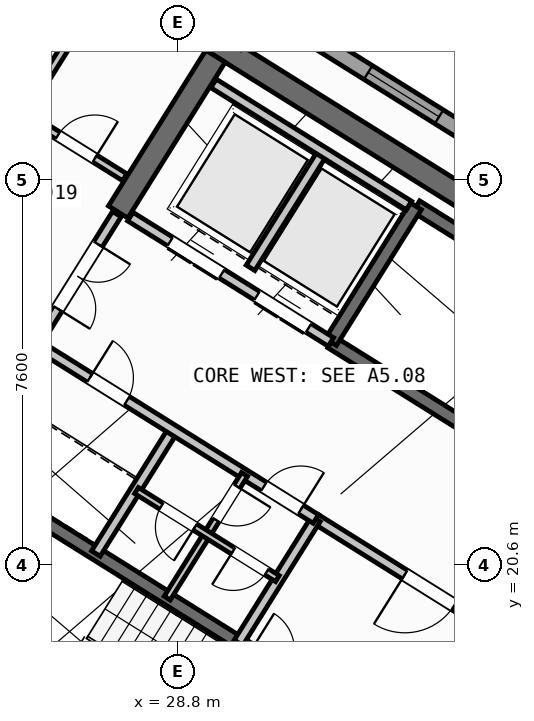
"""IFC4 building model, lengths in metres.
Left out: names, types, materials, properties, quantities, classifications, styles, units other than length and angle.
Written with IfcOpenShell. Run it as: python <this file> out.ifc"""

import sys

from ifc_helpers import new_model, si_unit, direction, frame, frame_2d, origin, place, context, subcontext, project, spatial, rectangle, extrude, source, transform, mapped, element, fill, save


model = new_model("IFC4")
c1 = context("Model", 3, precision=1e-05, world=origin(), true_north=direction((0.0, 1.0)))
c2 = subcontext(c1, "Body", "Model", "MODEL_VIEW")
j1 = project(units=[si_unit("LENGTHUNIT", "METRE"), si_unit("PLANEANGLEUNIT", "RADIAN")], contexts=[c1])
p1 = place(None, origin())
s1 = spatial("IfcSite", under=j1, at=p1, CompositionType="ELEMENT")
p2 = place(p1, origin())
s2 = spatial("IfcBuilding", under=s1, at=p2, CompositionType="ELEMENT")
p3 = place(p2, frame((0.0, 0.0, 277.2)))
s3 = spatial("IfcBuildingStorey", under=s2, at=p3, CompositionType="ELEMENT", Elevation=277.2)
p4 = place(p3, frame((40.531, 24.036, 0.0), z_axis=(0.0, 0.0, 1.0), x_axis=(-0.848048787466, 0.529918157905, 0.0)))
e1 = element("IfcWall", 1, at=p4, inside=s3, PredefinedType="SHEAR", context=c2, shape_type="SweptSolid", body=[
    extrude(rectangle(XDim=13.04, YDim=0.45, at=frame_2d((6.52, 0.0))), origin(), (0.0, 0.0, 1.0), 3.35),
])
p5 = place(p3, frame((33.324, 12.503, 0.0), z_axis=(0.0, 0.0, 1.0), x_axis=(-0.848043529849, 0.529926571782, 0.0)))
e2 = element("IfcWall", 2, at=p5, inside=s3, PredefinedType="SHEAR", context=c2, shape_type="SweptSolid", body=[
    extrude(rectangle(XDim=13.04, YDim=0.45, at=frame_2d((6.52, 0.0))), origin(), (0.0, 0.0, 1.0), 3.35),
])
p6 = place(p3, frame((29.544, 30.636, 0.0), z_axis=(0.0, 0.0, 1.0), x_axis=(-0.529902075036, -0.848058836916, 0.0)))
e3 = element("IfcWall", 3, at=p6, inside=s3, PredefinedType="SHEAR", context=c2, shape_type="SweptSolid", body=[
    extrude(rectangle(XDim=3.625, YDim=0.45, at=frame_2d((1.812, 0.0))), origin(), (0.0, 0.0, 1.0), 3.35),
])
p7 = place(p3, frame((29.268, 6.429, 0.0), z_axis=(0.0, 0.0, 1.0), x_axis=(-0.848049971435, 0.529916263149, 0.0)))
e4 = element("IfcWall", 4, at=p7, inside=s3, PredefinedType="STANDARD", context=c2, shape_type="SweptSolid", body=[
    extrude(rectangle(XDim=31.588, YDim=0.32, at=frame_2d((15.794, 0.0))), origin(), (0.0, 0.0, 1.0), 3.35),
])
p8 = place(p7, frame((16.362, 0.0, 0.0)))
e5 = element("IfcOpeningElement", 5, at=p8, cuts=e4, PredefinedType="OPENING", context=c2, shape_type="SweptSolid", body=[
    extrude(rectangle(XDim=1.2, YDim=2.15, at=frame_2d((0.6, 1.075))), frame((0.0, 0.17, 0.0), z_axis=(0.0, -1.0, 0.0), x_axis=(1.0, 0.0, 0.0)), (0.0, 0.0, 1.0), 0.34),
])
p9 = place(p7, frame((3.859, 0.0, 0.9)))
e6 = element("IfcOpeningElement", 6, at=p9, cuts=e4, PredefinedType="OPENING", context=c2, shape_type="SweptSolid", body=[
    extrude(rectangle(XDim=1.65, YDim=1.45, at=frame_2d((0.825, 0.725))), frame((0.0, 0.17, 0.0), z_axis=(0.0, -1.0, 0.0), x_axis=(1.0, 0.0, 0.0)), (0.0, 0.0, 1.0), 0.34),
])
p10 = place(p7, frame((10.519, 0.0, 0.9)))
e7 = element("IfcOpeningElement", 7, at=p10, cuts=e4, PredefinedType="OPENING", context=c2, shape_type="SweptSolid", body=[
    extrude(rectangle(XDim=1.65, YDim=1.45, at=frame_2d((0.825, 0.725))), frame((0.0, 0.17, 0.0), z_axis=(0.0, -1.0, 0.0), x_axis=(1.0, 0.0, 0.0)), (0.0, 0.0, 1.0), 0.34),
])
p11 = place(p7, frame((20.015, 0.0, 0.95)))
e8 = element("IfcOpeningElement", 8, at=p11, cuts=e4, PredefinedType="OPENING", context=c2, shape_type="SweptSolid", body=[
    extrude(rectangle(XDim=1.95, YDim=1.35, at=frame_2d((0.975, 0.675))), frame((0.0, 0.17, 0.0), z_axis=(0.0, -1.0, 0.0), x_axis=(1.0, 0.0, 0.0)), (0.0, 0.0, 1.0), 0.34),
])
p12 = place(p7, frame((23.715, 0.0, 1.0)))
e9 = element("IfcOpeningElement", 9, at=p12, cuts=e4, PredefinedType="OPENING", context=c2, shape_type="SweptSolid", body=[
    extrude(rectangle(XDim=0.9, YDim=1.25, at=frame_2d((0.45, 0.625))), frame((0.0, 0.17, 0.0), z_axis=(0.0, -1.0, 0.0), x_axis=(1.0, 0.0, 0.0)), (0.0, 0.0, 1.0), 0.34),
])
p13 = place(p7, frame((27.706, 0.0, 0.9)))
e10 = element("IfcOpeningElement", 10, at=p13, cuts=e4, PredefinedType="OPENING", context=c2, shape_type="SweptSolid", body=[
    extrude(rectangle(XDim=1.65, YDim=1.45, at=frame_2d((0.825, 0.725))), frame((0.0, 0.17, 0.0), z_axis=(0.0, -1.0, 0.0), x_axis=(1.0, 0.0, 0.0)), (0.0, 0.0, 1.0), 0.34),
])
p14 = place(p3, frame((14.138, 41.825, 0.0), z_axis=(0.0, 0.0, 1.0), x_axis=(0.848046498049, -0.529921821731, 0.0)))
e11 = element("IfcWall", 11, at=p14, inside=s3, PredefinedType="STANDARD", context=c2, shape_type="SweptSolid", body=[
    extrude(rectangle(XDim=31.588, YDim=0.32, at=frame_2d((15.794, 0.0))), origin(), (0.0, 0.0, 1.0), 3.35),
])
p15 = place(p14, frame((3.568, 0.0, 0.0)))
e12 = element("IfcOpeningElement", 12, at=p15, cuts=e11, PredefinedType="OPENING", context=c2, shape_type="SweptSolid", body=[
    extrude(rectangle(XDim=1.05, YDim=2.15, at=frame_2d((0.525, 1.075))), frame((0.0, 0.17, 0.0), z_axis=(0.0, -1.0, 0.0), x_axis=(1.0, 0.0, 0.0)), (0.0, 0.0, 1.0), 0.34),
])
p16 = place(p14, frame((1.046, 0.0, 0.9)))
e13 = element("IfcOpeningElement", 13, at=p16, cuts=e11, PredefinedType="OPENING", context=c2, shape_type="SweptSolid", body=[
    extrude(rectangle(XDim=1.65, YDim=1.45, at=frame_2d((0.825, 0.725))), frame((0.0, 0.17, 0.0), z_axis=(0.0, -1.0, 0.0), x_axis=(1.0, 0.0, 0.0)), (0.0, 0.0, 1.0), 0.34),
])
p17 = place(p14, frame((8.61, 0.0, 0.9)))
e14 = element("IfcOpeningElement", 14, at=p17, cuts=e11, PredefinedType="OPENING", context=c2, shape_type="SweptSolid", body=[
    extrude(rectangle(XDim=1.35, YDim=1.45, at=frame_2d((0.675, 0.725))), frame((0.0, 0.17, 0.0), z_axis=(0.0, -1.0, 0.0), x_axis=(1.0, 0.0, 0.0)), (0.0, 0.0, 1.0), 0.34),
])
p18 = place(p14, frame((13.599, 0.0, 0.95)))
e15 = element("IfcOpeningElement", 15, at=p18, cuts=e11, PredefinedType="OPENING", context=c2, shape_type="SweptSolid", body=[
    extrude(rectangle(XDim=1.95, YDim=1.35, at=frame_2d((0.975, 0.675))), frame((0.0, 0.17, 0.0), z_axis=(0.0, -1.0, 0.0), x_axis=(1.0, 0.0, 0.0)), (0.0, 0.0, 1.0), 0.34),
])
p19 = place(p14, frame((17.154, 0.0, 1.0)))
e16 = element("IfcOpeningElement", 16, at=p19, cuts=e11, PredefinedType="OPENING", context=c2, shape_type="SweptSolid", body=[
    extrude(rectangle(XDim=0.9, YDim=1.25, at=frame_2d((0.45, 0.625))), frame((0.0, 0.17, 0.0), z_axis=(0.0, -1.0, 0.0), x_axis=(1.0, 0.0, 0.0)), (0.0, 0.0, 1.0), 0.34),
])
p20 = place(p14, frame((21.719, 0.0, 0.9)))
e17 = element("IfcOpeningElement", 17, at=p20, cuts=e11, PredefinedType="OPENING", context=c2, shape_type="SweptSolid", body=[
    extrude(rectangle(XDim=1.65, YDim=1.45, at=frame_2d((0.825, 0.725))), frame((0.0, 0.17, 0.0), z_axis=(0.0, -1.0, 0.0), x_axis=(1.0, 0.0, 0.0)), (0.0, 0.0, 1.0), 0.34),
])
p21 = place(p14, frame((27.419, 0.0, 0.9)))
e18 = element("IfcOpeningElement", 18, at=p21, cuts=e11, PredefinedType="OPENING", context=c2, shape_type="SweptSolid", body=[
    extrude(rectangle(XDim=1.65, YDim=1.45, at=frame_2d((0.825, 0.725))), frame((0.0, 0.17, 0.0), z_axis=(0.0, -1.0, 0.0), x_axis=(1.0, 0.0, 0.0)), (0.0, 0.0, 1.0), 0.34),
])
p22 = place(p3, frame((29.605, 15.581, 0.0), z_axis=(0.0, 0.0, 1.0), x_axis=(-0.848036911448, 0.529937163087, 0.0)))
e19 = element("IfcWall", 19, at=p22, inside=s3, PredefinedType="SHEAR", context=c2, shape_type="SweptSolid", body=[
    extrude(rectangle(XDim=7.46, YDim=0.26, at=frame_2d((3.73, 0.0))), origin(), (0.0, 0.0, 1.0), 3.35),
])
p23 = place(p3, frame((31.28, 18.261, 0.0), z_axis=(0.0, 0.0, 1.0), x_axis=(-0.848051618787, 0.529913626805, 0.0)))
e20 = element("IfcWall", 20, at=p23, inside=s3, PredefinedType="SHEAR", context=c2, shape_type="SweptSolid", body=[
    extrude(rectangle(XDim=7.46, YDim=0.26, at=frame_2d((3.73, 0.0))), origin(), (0.0, 0.0, 1.0), 3.35),
])
p24 = place(p23, frame((0.36, 0.0, 0.0)))
e21 = element("IfcOpeningElement", 21, at=p24, cuts=e20, PredefinedType="OPENING", context=c2, shape_type="SweptSolid", body=[
    extrude(rectangle(XDim=0.86, YDim=2.05, at=frame_2d((0.43, 1.025))), frame((0.0, 0.14, 0.0), z_axis=(0.0, -1.0, 0.0), x_axis=(1.0, 0.0, 0.0)), (0.0, 0.0, 1.0), 0.28),
])
p25 = place(p3, frame((39.721, 23.788, 0.0), z_axis=(0.0, 0.0, 1.0), x_axis=(-0.848054434086, 0.529909121291, 0.0)))
e22 = element("IfcWall", 22, at=p25, inside=s3, PredefinedType="SHEAR", context=c2, shape_type="SweptSolid", body=[
    extrude(rectangle(XDim=7.33, YDim=0.26, at=frame_2d((3.665, 0.0))), origin(), (0.0, 0.0, 1.0), 3.35),
])
p26 = place(p3, frame((38.046, 21.108, 0.0), z_axis=(0.0, 0.0, 1.0), x_axis=(-0.848054434086, 0.529909121291, 0.0)))
e23 = element("IfcWall", 23, at=p26, inside=s3, PredefinedType="SHEAR", context=c2, shape_type="SweptSolid", body=[
    extrude(rectangle(XDim=7.33, YDim=0.26, at=frame_2d((3.665, 0.0))), origin(), (0.0, 0.0, 1.0), 3.35),
])
p27 = place(p26, frame((0.22, 0.0, 0.0)))
e24 = element("IfcOpeningElement", 24, at=p27, cuts=e23, PredefinedType="OPENING", context=c2, shape_type="SweptSolid", body=[
    extrude(rectangle(XDim=1.1, YDim=2.1, at=frame_2d((0.55, 1.05))), frame((0.0, 0.14, 0.0), z_axis=(0.0, -1.0, 0.0), x_axis=(1.0, 0.0, 0.0)), (0.0, 0.0, 1.0), 0.28),
])
p28 = place(p3, frame((33.496, 27.677, 0.0), z_axis=(0.0, 0.0, 1.0), x_axis=(-0.529908658664, -0.84805472316, 0.0)))
e25 = element("IfcWall", 25, at=p28, inside=s3, PredefinedType="SHEAR", context=c2, shape_type="SweptSolid", body=[
    extrude(rectangle(XDim=3.16, YDim=0.26, at=frame_2d((1.58, 0.0))), origin(), (0.0, 0.0, 1.0), 3.35),
])
p29 = place(p3, frame((36.459, 18.421, 0.0), z_axis=(0.0, 0.0, 1.0), x_axis=(-0.848059591691, 0.529900867089, 0.0)))
e26 = element("IfcWall", 26, at=p29, inside=s3, PredefinedType="STANDARD", context=c2, shape_type="SweptSolid", body=[
    extrude(rectangle(XDim=5.818, YDim=0.2, at=frame_2d((2.909, 0.0))), origin(), (0.0, 0.0, 1.0), 3.34),
])
p30 = place(p29, frame((2.598, 0.0, 0.0)))
e27 = element("IfcOpeningElement", 27, at=p30, cuts=e26, PredefinedType="OPENING", context=c2, shape_type="SweptSolid", body=[
    extrude(rectangle(XDim=1.15, YDim=2.1, at=frame_2d((0.575, 1.05))), frame((0.0, 0.11, 0.0), z_axis=(0.0, -1.0, 0.0), x_axis=(1.0, 0.0, 0.0)), (0.0, 0.0, 1.0), 0.22),
])
p31 = place(p3, frame((31.822, 24.998, 0.0), z_axis=(0.0, 0.0, 1.0), x_axis=(-0.848054125777, 0.529909614701, 0.0)))
e28 = element("IfcWall", 28, at=p31, inside=s3, PredefinedType="STANDARD", context=c2, shape_type="SweptSolid", body=[
    extrude(rectangle(XDim=4.668, YDim=0.2, at=frame_2d((2.334, 0.0))), origin(), (0.0, 0.0, 1.0), 3.34),
])
p32 = place(p31, frame((0.52, 0.0, 0.0)))
e29 = element("IfcOpeningElement", 29, at=p32, cuts=e28, PredefinedType="OPENING", context=c2, shape_type="SweptSolid", body=[
    extrude(rectangle(XDim=1.2, YDim=2.15, at=frame_2d((0.6, 1.075))), frame((0.0, 0.11, 0.0), z_axis=(0.0, -1.0, 0.0), x_axis=(1.0, 0.0, 0.0)), (0.0, 0.0, 1.0), 0.22),
])
p33 = place(p31, frame((2.54, 0.0, 0.0)))
e30 = element("IfcOpeningElement", 30, at=p33, cuts=e28, PredefinedType="OPENING", context=c2, shape_type="SweptSolid", body=[
    extrude(rectangle(XDim=1.2, YDim=2.15, at=frame_2d((0.6, 1.075))), frame((0.0, 0.11, 0.0), z_axis=(0.0, -1.0, 0.0), x_axis=(1.0, 0.0, 0.0)), (0.0, 0.0, 1.0), 0.22),
])
p34 = place(p3, frame((31.645, 28.716, 0.0), z_axis=(0.0, 0.0, 1.0), x_axis=(-0.52986693015, -0.848080795876, 0.0)))
e31 = element("IfcWall", 31, at=p34, inside=s3, PredefinedType="STANDARD", context=c2, shape_type="SweptSolid", body=[
    extrude(rectangle(XDim=2.66, YDim=0.2, at=frame_2d((1.33, 0.0))), origin(), (0.0, 0.0, 1.0), 3.34),
])
p35 = place(p3, frame((33.363, 27.69, 0.0), z_axis=(0.0, 0.0, 1.0), x_axis=(-0.84804957148, 0.529916903215, 0.0)))
e32 = element("IfcWall", 32, at=p35, inside=s3, PredefinedType="STANDARD", context=c2, shape_type="SweptSolid", body=[
    extrude(rectangle(XDim=4.548, YDim=0.2, at=frame_2d((2.274, 0.0))), origin(), (0.0, 0.0, 1.0), 3.34),
])
for number, where, z_axis, x_axis in (
    (33, (31.525, 21.504, 0.0), (0.0, 0.0, 1.0), (-0.53, -0.848, 0.0)),
    (34, (28.71, 23.263, 0.0), (0.0, 0.0, 1.0), (-0.53, -0.848, 0.0)),
):
    element("IfcWall", number, at=place(p3, frame(where, z_axis=z_axis, x_axis=x_axis)), inside=s3, PredefinedType="STANDARD", context=c2, shape_type="SweptSolid", body=[
        extrude(rectangle(XDim=2.88, YDim=0.2, at=frame_2d((1.44, 0.0))), origin(), (0.0, 0.0, 1.0), 3.34),
    ])
p36 = place(p3, frame((31.525, 21.504, 0.0), z_axis=(0.0, 0.0, 1.0), x_axis=(-0.848042066329, 0.529928913853, 0.0)))
e35 = element("IfcWall", 35, at=p36, inside=s3, PredefinedType="STANDARD", context=c2, shape_type="SweptSolid", body=[
    extrude(rectangle(XDim=6.268, YDim=0.2, at=frame_2d((3.134, 0.0))), origin(), (0.0, 0.0, 1.0), 3.34),
])
p37 = place(p36, frame((4.4, 0.0, 0.0)))
e36 = element("IfcOpeningElement", 36, at=p37, cuts=e35, PredefinedType="OPENING", context=c2, shape_type="SweptSolid", body=[
    extrude(rectangle(XDim=0.86, YDim=2.05, at=frame_2d((0.43, 1.025))), frame((0.0, 0.11, 0.0), z_axis=(0.0, -1.0, 0.0), x_axis=(1.0, 0.0, 0.0)), (0.0, 0.0, 1.0), 0.22),
])
p38 = place(p36, frame((0.35, 0.0, 0.0)))
e37 = element("IfcOpeningElement", 37, at=p38, cuts=e35, PredefinedType="OPENING", context=c2, shape_type="SweptSolid", body=[
    extrude(rectangle(XDim=0.86, YDim=2.05, at=frame_2d((0.43, 1.025))), frame((0.0, 0.11, 0.0), z_axis=(0.0, -1.0, 0.0), x_axis=(1.0, 0.0, 0.0)), (0.0, 0.0, 1.0), 0.22),
])
p39 = place(p3, frame((30.117, 22.384, 0.0), z_axis=(0.0, 0.0, 1.0), x_axis=(-0.529951914384, -0.848027693204, 0.0)))
e38 = element("IfcWall", 38, at=p39, inside=s3, PredefinedType="PLUMBINGWALL", context=c2, shape_type="SweptSolid", body=[
    extrude(rectangle(XDim=1.4, YDim=0.14, at=frame_2d((0.7, 0.0))), origin(), (0.0, 0.0, 1.0), 3.34),
])
p40 = place(p39, frame((0.28, 0.0, 0.0)))
e39 = element("IfcOpeningElement", 39, at=p40, cuts=e38, PredefinedType="OPENING", context=c2, shape_type="SweptSolid", body=[
    extrude(rectangle(XDim=0.78, YDim=2.05, at=frame_2d((0.39, 1.025))), frame((0.0, 0.08, 0.0), z_axis=(0.0, -1.0, 0.0), x_axis=(1.0, 0.0, 0.0)), (0.0, 0.0, 1.0), 0.16),
])
p41 = place(p3, frame((29.375, 21.196, 0.0), z_axis=(0.0, 0.0, 1.0), x_axis=(-0.529865479138, -0.848081702443, 0.0)))
e40 = element("IfcWall", 40, at=p41, inside=s3, PredefinedType="PLUMBINGWALL", context=c2, shape_type="SweptSolid", body=[
    extrude(rectangle(XDim=1.48, YDim=0.14, at=frame_2d((0.74, 0.0))), origin(), (0.0, 0.0, 1.0), 3.34),
])
p42 = place(p3, frame((30.766, 20.327, 0.0), z_axis=(0.0, 0.0, 1.0), x_axis=(-0.848052663127, 0.529911955482, 0.0)))
e41 = element("IfcWall", 41, at=p42, inside=s3, PredefinedType="PLUMBINGWALL", context=c2, shape_type="SweptSolid", body=[
    extrude(rectangle(XDim=3.28, YDim=0.14, at=frame_2d((1.64, 0.0))), origin(), (0.0, 0.0, 1.0), 3.34),
])
p43 = place(p42, frame((0.25, 0.0, 0.0)))
e42 = element("IfcOpeningElement", 42, at=p43, cuts=e41, PredefinedType="OPENING", context=c2, shape_type="SweptSolid", body=[
    extrude(rectangle(XDim=0.78, YDim=2.05, at=frame_2d((0.39, 1.025))), frame((0.0, 0.08, 0.0), z_axis=(0.0, -1.0, 0.0), x_axis=(1.0, 0.0, 0.0)), (0.0, 0.0, 1.0), 0.16),
])
p44 = place(p42, frame((1.92, 0.0, 0.0)))
e43 = element("IfcOpeningElement", 43, at=p44, cuts=e41, PredefinedType="OPENING", context=c2, shape_type="SweptSolid", body=[
    extrude(rectangle(XDim=0.78, YDim=2.05, at=frame_2d((0.39, 1.025))), frame((0.0, 0.08, 0.0), z_axis=(0.0, -1.0, 0.0), x_axis=(1.0, 0.0, 0.0)), (0.0, 0.0, 1.0), 0.16),
])
p45 = place(p3, frame((27.596, 27.52, 0.0), z_axis=(0.0, 0.0, 1.0), x_axis=(-0.529865479138, -0.848081702443, 0.0)))
e44 = element("IfcWall", 44, at=p45, inside=s3, PredefinedType="STANDARD", context=c2, shape_type="SweptSolid", body=[
    extrude(rectangle(XDim=2.96, YDim=0.2, at=frame_2d((1.48, 0.0))), origin(), (0.0, 0.0, 1.0), 3.34),
])
p46 = place(p45, frame((0.7, 0.0, 0.0)))
e45 = element("IfcOpeningElement", 45, at=p46, cuts=e44, PredefinedType="OPENING", context=c2, shape_type="SweptSolid", body=[
    extrude(rectangle(XDim=1.5, YDim=2.15, at=frame_2d((0.75, 1.075))), frame((0.0, 0.11, 0.0), z_axis=(0.0, -1.0, 0.0), x_axis=(1.0, 0.0, 0.0)), (0.0, 0.0, 1.0), 0.22),
])
p47 = place(p3, frame((27.753, 28.247, 0.0), z_axis=(0.0, 0.0, 1.0), x_axis=(-0.848033204961, 0.529943094382, 0.0)))
e46 = element("IfcWall", 46, at=p47, inside=s3, PredefinedType="PARTITIONING", context=c2, shape_type="SweptSolid", body=[
    extrude(rectangle(XDim=2.358, YDim=0.16, at=frame_2d((1.179, 0.0))), origin(), (0.0, 0.0, 1.0), 3.34),
])
p48 = place(p47, frame((0.698, 0.0, 0.0)))
e47 = element("IfcOpeningElement", 47, at=p48, cuts=e46, PredefinedType="OPENING", context=c2, shape_type="SweptSolid", body=[
    extrude(rectangle(XDim=0.86, YDim=2.05, at=frame_2d((0.43, 1.025))), frame((0.0, 0.09, 0.0), z_axis=(0.0, -1.0, 0.0), x_axis=(1.0, 0.0, 0.0)), (0.0, 0.0, 1.0), 0.18),
])
p49 = place(p3, frame((27.953, 33.016, 0.0), z_axis=(0.0, 0.0, 1.0), x_axis=(-0.529872022255, -0.848077614391, 0.0)))
e48 = element("IfcWall", 48, at=p49, inside=s3, PredefinedType="PARTITIONING", context=c2, shape_type="SweptSolid", body=[
    extrude(rectangle(XDim=4.15, YDim=0.16, at=frame_2d((2.075, 0.0))), origin(), (0.0, 0.0, 1.0), 3.34),
])
m1 = source(origin(), c2, "Body", "SweptSolid", [
    extrude(rectangle(XDim=1.65, YDim=1.45, at=frame_2d((0.825, 0.725))), frame((0.0, 0.03, 0.0), z_axis=(0.0, -1.0, 0.0), x_axis=(1.0, 0.0, 0.0)), (0.0, 0.0, 1.0), 0.06),
])
p50 = place(p20, origin())
e49 = element("IfcWindow", 49, at=p50, inside=s3, PartitioningType="SINGLE_PANEL", PredefinedType="WINDOW", context=c2, shape_type="MappedRepresentation", body=[
    mapped(m1, transform((0.0, 0.0, 0.0), scale=1.0)),
])
fill(e17, e49)
m2 = source(origin(), c2, "Body", "SweptSolid", [
    extrude(rectangle(XDim=1.15, YDim=2.1, at=frame_2d((0.575, 1.05))), frame((0.0, 0.025, 0.0), z_axis=(0.0, -1.0, 0.0), x_axis=(1.0, 0.0, 0.0)), (0.0, 0.0, 1.0), 0.05),
])
p51 = place(p30, origin())
e50 = element("IfcDoor", 50, at=p51, inside=s3, OperationType="SINGLE_SWING_RIGHT", PredefinedType="DOOR", context=c2, shape_type="MappedRepresentation", body=[
    mapped(m2, transform((0.0, 0.0, 0.0), scale=1.0)),
])
fill(e27, e50)
m3 = source(origin(), c2, "Body", "SweptSolid", [
    extrude(rectangle(XDim=1.2, YDim=2.15, at=frame_2d((0.6, 1.075))), frame((0.0, 0.025, 0.0), z_axis=(0.0, -1.0, 0.0), x_axis=(1.0, 0.0, 0.0)), (0.0, 0.0, 1.0), 0.05),
])
p52 = place(p32, origin())
e51 = element("IfcDoor", 51, at=p52, inside=s3, OperationType="DOUBLE_DOOR_SLIDING", PredefinedType="DOOR", context=c2, shape_type="MappedRepresentation", body=[
    mapped(m3, transform((0.0, 0.0, 0.0), scale=1.0)),
])
fill(e29, e51)
p53 = place(p33, origin())
e52 = element("IfcDoor", 52, at=p53, inside=s3, OperationType="DOUBLE_DOOR_SLIDING", PredefinedType="DOOR", context=c2, shape_type="MappedRepresentation", body=[
    mapped(m3, transform((0.0, 0.0, 0.0), scale=1.0)),
])
fill(e30, e52)
m4 = source(origin(), c2, "Body", "SweptSolid", [
    extrude(rectangle(XDim=0.86, YDim=2.05, at=frame_2d((0.43, 1.025))), frame((0.0, 0.025, 0.0), z_axis=(0.0, -1.0, 0.0), x_axis=(1.0, 0.0, 0.0)), (0.0, 0.0, 1.0), 0.05),
])
p54 = place(p37, frame((0.86, 0.0, 0.0), z_axis=(0.0, 0.0, 1.0), x_axis=(-1.0, 0.0, 0.0)))
e53 = element("IfcDoor", 53, at=p54, inside=s3, OperationType="SINGLE_SWING_LEFT", PredefinedType="DOOR", context=c2, shape_type="MappedRepresentation", body=[
    mapped(m4, transform((0.0, 0.0, 0.0), scale=1.0)),
])
fill(e36, e53)
p55 = place(p38, frame((0.86, 0.0, 0.0), z_axis=(0.0, 0.0, 1.0), x_axis=(-1.0, 0.0, 0.0)))
e54 = element("IfcDoor", 54, at=p55, inside=s3, OperationType="SINGLE_SWING_RIGHT", PredefinedType="DOOR", context=c2, shape_type="MappedRepresentation", body=[
    mapped(m4, transform((0.0, 0.0, 0.0), scale=1.0)),
])
fill(e37, e54)
m5 = source(origin(), c2, "Body", "SweptSolid", [
    extrude(rectangle(XDim=0.78, YDim=2.05, at=frame_2d((0.39, 1.025))), frame((0.0, 0.025, 0.0), z_axis=(0.0, -1.0, 0.0), x_axis=(1.0, 0.0, 0.0)), (0.0, 0.0, 1.0), 0.05),
])
p56 = place(p40, origin())
e55 = element("IfcDoor", 55, at=p56, inside=s3, OperationType="SINGLE_SWING_LEFT", PredefinedType="DOOR", context=c2, shape_type="MappedRepresentation", body=[
    mapped(m5, transform((0.0, 0.0, 0.0), scale=1.0)),
])
fill(e39, e55)
p57 = place(p43, origin())
e56 = element("IfcDoor", 56, at=p57, inside=s3, OperationType="SINGLE_SWING_RIGHT", PredefinedType="DOOR", context=c2, shape_type="MappedRepresentation", body=[
    mapped(m5, transform((0.0, 0.0, 0.0), scale=1.0)),
])
fill(e42, e56)
p58 = place(p44, origin())
e57 = element("IfcDoor", 57, at=p58, inside=s3, OperationType="SINGLE_SWING_LEFT", PredefinedType="DOOR", context=c2, shape_type="MappedRepresentation", body=[
    mapped(m5, transform((0.0, 0.0, 0.0), scale=1.0)),
])
fill(e43, e57)
p59 = place(p48, frame((0.86, 0.0, 0.0), z_axis=(0.0, 0.0, 1.0), x_axis=(-1.0, 0.0, 0.0)))
e58 = element("IfcDoor", 58, at=p59, inside=s3, OperationType="SINGLE_SWING_RIGHT", PredefinedType="DOOR", context=c2, shape_type="MappedRepresentation", body=[
    mapped(m4, transform((0.0, 0.0, 0.0), scale=1.0)),
])
fill(e47, e58)
m6 = source(origin(), c2, "Body", "SweptSolid", [
    extrude(rectangle(XDim=1.5, YDim=2.15, at=frame_2d((0.75, 1.075))), frame((0.0, 0.025, 0.0), z_axis=(0.0, -1.0, 0.0), x_axis=(1.0, 0.0, 0.0)), (0.0, 0.0, 1.0), 0.05),
])
p60 = place(p46, origin())
e59 = element("IfcDoor", 59, at=p60, inside=s3, OperationType="DOUBLE_DOOR_SINGLE_SWING", PredefinedType="DOOR", context=c2, shape_type="MappedRepresentation", body=[
    mapped(m6, transform((0.0, 0.0, 0.0), scale=1.0)),
])
fill(e45, e59)
save(model, sys.argv[1])
